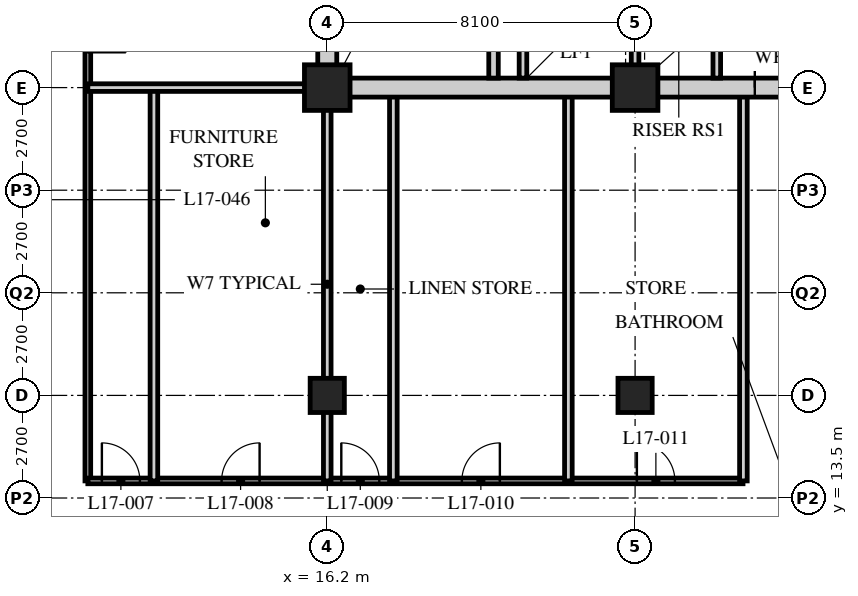
"""IFC4 building model, lengths in metres.
Left out: names, types, materials, properties, quantities, classifications, styles, units other than length and angle.
Written with IfcOpenShell. Run it as: python <this file> out.ifc"""

import sys

from ifc_helpers import new_model, si_unit, direction, frame, frame_2d, origin, origin_2d, place, context, subcontext, project, spatial, rectangle, hollow_rectangle, extrude, element, fill, save


model = new_model("IFC4")
c1 = context("Model", 3, precision=1e-05, world=origin(), true_north=direction((0.0, 1.0)))
c2 = subcontext(c1, "Body", "Model", "MODEL_VIEW")
j1 = project(units=[si_unit("LENGTHUNIT", "METRE"), si_unit("PLANEANGLEUNIT", "RADIAN")], contexts=[c1])
p1 = place(None, origin())
s1 = spatial("IfcSite", under=j1, at=p1, CompositionType="ELEMENT")
p2 = place(p1, origin())
s2 = spatial("IfcBuilding", under=s1, at=p2, CompositionType="ELEMENT")
p3 = place(p2, frame((0.0, 0.0, 70.4)))
s3 = spatial("IfcBuildingStorey", under=s2, at=p3, CompositionType="ELEMENT", Elevation=70.4)
p4 = place(p3, frame((16.2, 16.2, 0.0), z_axis=(0.0, 0.0, 1.0), x_axis=(1.0, 0.0, 0.0)))
e1 = element("IfcColumn", 1, at=p4, inside=s3, PredefinedType="COLUMN", context=c2, shape_type="SweptSolid", body=[
    extrude(hollow_rectangle(XDim=0.9, YDim=0.9, WallThickness=0.09, at=origin_2d()), origin(), (0.0, 0.0, 1.0), 3.4),
])
p5 = place(p3, frame((16.2, 24.3, 0.0), z_axis=(0.0, 0.0, 1.0), x_axis=(1.0, 0.0, 0.0)))
e2 = element("IfcColumn", 2, at=p5, inside=s3, PredefinedType="COLUMN", context=c2, shape_type="SweptSolid", body=[
    extrude(hollow_rectangle(XDim=1.2, YDim=1.2, WallThickness=0.12, at=origin_2d()), origin(), (0.0, 0.0, 1.0), 3.4),
])
p6 = place(p3, frame((24.3, 16.2, 0.0), z_axis=(0.0, 0.0, 1.0), x_axis=(1.0, 0.0, 0.0)))
e3 = element("IfcColumn", 3, at=p6, inside=s3, PredefinedType="COLUMN", context=c2, shape_type="SweptSolid", body=[
    extrude(hollow_rectangle(XDim=0.9, YDim=0.9, WallThickness=0.09, at=origin_2d()), origin(), (0.0, 0.0, 1.0), 3.4),
])
p7 = place(p3, frame((24.3, 24.3, 0.0), z_axis=(0.0, 0.0, 1.0), x_axis=(1.0, 0.0, 0.0)))
e4 = element("IfcColumn", 4, at=p7, inside=s3, PredefinedType="COLUMN", context=c2, shape_type="SweptSolid", body=[
    extrude(hollow_rectangle(XDim=1.2, YDim=1.2, WallThickness=0.12, at=origin_2d()), origin(), (0.0, 0.0, 1.0), 3.4),
])
p8 = place(p3, frame((9.9, 40.5, 0.0), z_axis=(0.0, 0.0, 1.0), x_axis=(0.0, -1.0, 0.0)))
e5 = element("IfcWall", 5, at=p8, inside=s3, PredefinedType="PARTITIONING", context=c2, shape_type="SweptSolid", body=[
    extrude(rectangle(XDim=26.55, YDim=0.15, at=frame_2d((13.275, 0.0))), origin(), (0.0, 0.0, 1.0), 3.19),
])
p9 = place(p8, frame((14.271, 0.0, 0.0)))
e6 = element("IfcOpeningElement", 6, at=p9, cuts=e5, PredefinedType="OPENING", context=c2, shape_type="SweptSolid", body=[
    extrude(rectangle(XDim=1.0, YDim=2.1, at=frame_2d((0.5, 1.05))), frame((0.0, 0.085, 0.0), z_axis=(0.0, -1.0, 0.0), x_axis=(1.0, 0.0, 0.0)), (0.0, 0.0, 1.0), 0.17),
])
p10 = place(p8, frame((10.221, 0.0, 0.0)))
e7 = element("IfcOpeningElement", 7, at=p10, cuts=e5, PredefinedType="OPENING", context=c2, shape_type="SweptSolid", body=[
    extrude(rectangle(XDim=1.0, YDim=2.1, at=frame_2d((0.5, 1.05))), frame((0.0, 0.085, 0.0), z_axis=(0.0, -1.0, 0.0), x_axis=(1.0, 0.0, 0.0)), (0.0, 0.0, 1.0), 0.17),
])
p11 = place(p8, frame((6.8, 0.0, 0.0)))
e8 = element("IfcOpeningElement", 8, at=p11, cuts=e5, PredefinedType="OPENING", context=c2, shape_type="SweptSolid", body=[
    extrude(rectangle(XDim=1.0, YDim=2.1, at=frame_2d((0.5, 1.05))), frame((0.0, 0.085, 0.0), z_axis=(0.0, -1.0, 0.0), x_axis=(1.0, 0.0, 0.0)), (0.0, 0.0, 1.0), 0.17),
])
p12 = place(p8, frame((2.75, 0.0, 0.0)))
e9 = element("IfcOpeningElement", 9, at=p12, cuts=e5, PredefinedType="OPENING", context=c2, shape_type="SweptSolid", body=[
    extrude(rectangle(XDim=1.0, YDim=2.1, at=frame_2d((0.5, 1.05))), frame((0.0, 0.085, 0.0), z_axis=(0.0, -1.0, 0.0), x_axis=(1.0, 0.0, 0.0)), (0.0, 0.0, 1.0), 0.17),
])
p13 = place(p3, frame((9.9, 13.95, 0.0), z_axis=(0.0, 0.0, 1.0), x_axis=(1.0, 0.0, 0.0)))
e10 = element("IfcWall", 10, at=p13, inside=s3, PredefinedType="PARTITIONING", context=c2, shape_type="SweptSolid", body=[
    extrude(rectangle(XDim=17.24, YDim=0.15, at=frame_2d((8.62, 0.0))), origin(), (0.0, 0.0, 1.0), 3.19),
])
p14 = place(p13, frame((0.37, 0.0, 0.0)))
e11 = element("IfcOpeningElement", 11, at=p14, cuts=e10, PredefinedType="OPENING", context=c2, shape_type="SweptSolid", body=[
    extrude(rectangle(XDim=1.0, YDim=2.1, at=frame_2d((0.5, 1.05))), frame((0.0, 0.085, 0.0), z_axis=(0.0, -1.0, 0.0), x_axis=(1.0, 0.0, 0.0)), (0.0, 0.0, 1.0), 0.17),
])
p15 = place(p13, frame((3.52, 0.0, 0.0)))
e12 = element("IfcOpeningElement", 12, at=p15, cuts=e10, PredefinedType="OPENING", context=c2, shape_type="SweptSolid", body=[
    extrude(rectangle(XDim=1.0, YDim=2.1, at=frame_2d((0.5, 1.05))), frame((0.0, 0.085, 0.0), z_axis=(0.0, -1.0, 0.0), x_axis=(1.0, 0.0, 0.0)), (0.0, 0.0, 1.0), 0.17),
])
p16 = place(p13, frame((6.67, 0.0, 0.0)))
e13 = element("IfcOpeningElement", 13, at=p16, cuts=e10, PredefinedType="OPENING", context=c2, shape_type="SweptSolid", body=[
    extrude(rectangle(XDim=1.0, YDim=2.1, at=frame_2d((0.5, 1.05))), frame((0.0, 0.085, 0.0), z_axis=(0.0, -1.0, 0.0), x_axis=(1.0, 0.0, 0.0)), (0.0, 0.0, 1.0), 0.17),
])
p17 = place(p13, frame((9.842, 0.0, 0.0)))
e14 = element("IfcOpeningElement", 14, at=p17, cuts=e10, PredefinedType="OPENING", context=c2, shape_type="SweptSolid", body=[
    extrude(rectangle(XDim=1.0, YDim=2.1, at=frame_2d((0.5, 1.05))), frame((0.0, 0.085, 0.0), z_axis=(0.0, -1.0, 0.0), x_axis=(1.0, 0.0, 0.0)), (0.0, 0.0, 1.0), 0.17),
])
p18 = place(p13, frame((14.447, 0.0, 0.0)))
e15 = element("IfcOpeningElement", 15, at=p18, cuts=e10, PredefinedType="OPENING", context=c2, shape_type="SweptSolid", body=[
    extrude(rectangle(XDim=1.0, YDim=2.1, at=frame_2d((0.5, 1.05))), frame((0.0, 0.085, 0.0), z_axis=(0.0, -1.0, 0.0), x_axis=(1.0, 0.0, 0.0)), (0.0, 0.0, 1.0), 0.17),
])
p19 = place(p3, frame((16.2, 13.95, 0.0), z_axis=(0.0, 0.0, 1.0), x_axis=(0.0, 1.0, 0.0)))
e16 = element("IfcWall", 16, at=p19, inside=s3, PredefinedType="SOLIDWALL", context=c2, shape_type="SweptSolid", body=[
    extrude(rectangle(XDim=10.35, YDim=0.2, at=frame_2d((5.175, 0.0))), origin(), (0.0, 0.0, 1.0), 2.578),
])
for number, where, z_axis, x_axis in (
    (17, (11.639, 13.95, 0.0), (0.0, 0.0, 1.0), (0.0, 1.0, 0.0)),
    (18, (17.939, 13.95, 0.0), (0.0, 0.0, 1.0), (0.0, 1.0, 0.0)),
    (19, (22.545, 13.95, 0.0), (0.0, 0.0, 1.0), (0.0, 1.0, 0.0)),
    (20, (27.15, 13.95, 0.0), (0.0, 0.0, 1.0), (0.0, 1.0, 0.0)),
):
    element("IfcWall", number, at=place(p3, frame(where, z_axis=z_axis, x_axis=x_axis)), inside=s3, PredefinedType="SOLIDWALL", context=c2, shape_type="SweptSolid", body=[
        extrude(rectangle(XDim=10.35, YDim=0.2, at=frame_2d((5.175, 0.0))), origin(), (0.0, 0.0, 1.0), 3.19),
    ])
p20 = place(p3, frame((9.9, 24.3, 0.0), z_axis=(0.0, 0.0, 1.0), x_axis=(1.0, 0.0, 0.0)))
e21 = element("IfcWall", 21, at=p20, inside=s3, PredefinedType="SOLIDWALL", context=c2, shape_type="SweptSolid", body=[
    extrude(rectangle(XDim=6.3, YDim=0.2, at=frame_2d((3.15, 0.0))), origin(), (0.0, 0.0, 1.0), 2.578),
])
p21 = place(p3, frame((15.95, 24.3, 0.0), z_axis=(0.0, 0.0, 1.0), x_axis=(1.0, 0.0, 0.0)))
e22 = element("IfcWall", 22, at=p21, inside=s3, PredefinedType="SOLIDWALL", context=c2, shape_type="SweptSolid", body=[
    extrude(rectangle(XDim=24.8, YDim=0.5, at=frame_2d((12.4, 0.0))), origin(), (0.0, 0.0, 1.0), 2.54),
])
p22 = place(p21, frame((11.5, 0.0, 0.0)))
e23 = element("IfcOpeningElement", 23, at=p22, cuts=e22, PredefinedType="OPENING", context=c2, shape_type="SweptSolid", body=[
    extrude(rectangle(XDim=1.8, YDim=2.4, at=frame_2d((0.9, 1.2))), frame((0.0, 0.26, 0.0), z_axis=(0.0, -1.0, 0.0), x_axis=(1.0, 0.0, 0.0)), (0.0, 0.0, 1.0), 0.52),
])
p23 = place(p3, frame((16.2, 24.55, 0.0), z_axis=(0.0, 0.0, 1.0), x_axis=(0.0, 1.0, 0.0)))
e24 = element("IfcWall", 24, at=p23, inside=s3, PredefinedType="SOLIDWALL", context=c2, shape_type="SweptSolid", body=[
    extrude(rectangle(XDim=15.7, YDim=0.5, at=frame_2d((7.85, 0.0))), origin(), (0.0, 0.0, 1.0), 2.578),
])
p24 = place(p3, frame((24.3, 24.55, 0.0), z_axis=(0.0, 0.0, 1.0), x_axis=(0.0, 1.0, 0.0)))
e25 = element("IfcWall", 25, at=p24, inside=s3, PredefinedType="SOLIDWALL", context=c2, shape_type="SweptSolid", body=[
    extrude(rectangle(XDim=7.75, YDim=0.2, at=frame_2d((3.875, 0.0))), origin(), (0.0, 0.0, 1.0), 2.578),
])
p25 = place(p24, frame((4.6, 0.0, 0.0)))
e26 = element("IfcOpeningElement", 26, at=p25, cuts=e25, PredefinedType="OPENING", context=c2, shape_type="SweptSolid", body=[
    extrude(rectangle(XDim=1.2, YDim=2.1, at=frame_2d((0.6, 1.05))), frame((0.0, 0.11, 0.0), z_axis=(0.0, -1.0, 0.0), x_axis=(1.0, 0.0, 0.0)), (0.0, 0.0, 1.0), 0.22),
])
p26 = place(p3, frame((20.575, 24.55, 0.0), z_axis=(0.0, 0.0, 1.0), x_axis=(0.0, 1.0, 0.0)))
e27 = element("IfcWall", 27, at=p26, inside=s3, PredefinedType="SOLIDWALL", context=c2, shape_type="SweptSolid", body=[
    extrude(rectangle(XDim=7.75, YDim=0.25, at=frame_2d((3.875, 0.0))), origin(), (0.0, 0.0, 1.0), 3.19),
])
p27 = place(p26, frame((6.2, 0.0, 0.0)))
e28 = element("IfcOpeningElement", 28, at=p27, cuts=e27, PredefinedType="OPENING", context=c2, shape_type="SweptSolid", body=[
    extrude(rectangle(XDim=1.2, YDim=2.1, at=frame_2d((0.6, 1.05))), frame((0.0, 0.135, 0.0), z_axis=(0.0, -1.0, 0.0), x_axis=(1.0, 0.0, 0.0)), (0.0, 0.0, 1.0), 0.27),
])
p28 = place(p3, frame((21.35, 24.55, 0.0), z_axis=(0.0, 0.0, 1.0), x_axis=(0.0, 1.0, 0.0)))
e29 = element("IfcWall", 29, at=p28, inside=s3, PredefinedType="SOLIDWALL", context=c2, shape_type="SweptSolid", body=[
    extrude(rectangle(XDim=2.6, YDim=0.2, at=frame_2d((1.3, 0.0))), origin(), (0.0, 0.0, 1.0), 3.19),
])
p29 = place(p3, frame((26.45, 24.55, 0.0), z_axis=(0.0, 0.0, 1.0), x_axis=(0.0, 1.0, 0.0)))
e30 = element("IfcWall", 30, at=p29, inside=s3, PredefinedType="SOLIDWALL", context=c2, shape_type="SweptSolid", body=[
    extrude(rectangle(XDim=1.6, YDim=0.2, at=frame_2d((0.8, 0.0))), origin(), (0.0, 0.0, 1.0), 3.19),
])
p30 = place(p14, origin())
e31 = element("IfcDoor", 31, at=p30, inside=s3, OperationType="SINGLE_SWING_LEFT", PredefinedType="DOOR", context=c2, shape_type="SweptSolid", body=[
    extrude(rectangle(XDim=1.0, YDim=2.1, at=frame_2d((0.5, 1.05))), frame((0.0, 0.025, 0.0), z_axis=(0.0, -1.0, 0.0), x_axis=(1.0, 0.0, 0.0)), (0.0, 0.0, 1.0), 0.05),
])
fill(e11, e31)
p31 = place(p15, origin())
e32 = element("IfcDoor", 32, at=p31, inside=s3, OperationType="SINGLE_SWING_RIGHT", PredefinedType="DOOR", context=c2, shape_type="SweptSolid", body=[
    extrude(rectangle(XDim=1.0, YDim=2.1, at=frame_2d((0.5, 1.05))), frame((0.0, 0.025, 0.0), z_axis=(0.0, -1.0, 0.0), x_axis=(1.0, 0.0, 0.0)), (0.0, 0.0, 1.0), 0.05),
])
fill(e12, e32)
p32 = place(p16, origin())
e33 = element("IfcDoor", 33, at=p32, inside=s3, OperationType="SINGLE_SWING_LEFT", PredefinedType="DOOR", context=c2, shape_type="SweptSolid", body=[
    extrude(rectangle(XDim=1.0, YDim=2.1, at=frame_2d((0.5, 1.05))), frame((0.0, 0.025, 0.0), z_axis=(0.0, -1.0, 0.0), x_axis=(1.0, 0.0, 0.0)), (0.0, 0.0, 1.0), 0.05),
])
fill(e13, e33)
p33 = place(p17, origin())
e34 = element("IfcDoor", 34, at=p33, inside=s3, OperationType="SINGLE_SWING_RIGHT", PredefinedType="DOOR", context=c2, shape_type="SweptSolid", body=[
    extrude(rectangle(XDim=1.0, YDim=2.1, at=frame_2d((0.5, 1.05))), frame((0.0, 0.025, 0.0), z_axis=(0.0, -1.0, 0.0), x_axis=(1.0, 0.0, 0.0)), (0.0, 0.0, 1.0), 0.05),
])
fill(e14, e34)
p34 = place(p18, origin())
e35 = element("IfcDoor", 35, at=p34, inside=s3, OperationType="SINGLE_SWING_LEFT", PredefinedType="DOOR", context=c2, shape_type="SweptSolid", body=[
    extrude(rectangle(XDim=1.0, YDim=2.1, at=frame_2d((0.5, 1.05))), frame((0.0, 0.025, 0.0), z_axis=(0.0, -1.0, 0.0), x_axis=(1.0, 0.0, 0.0)), (0.0, 0.0, 1.0), 0.05),
])
fill(e15, e35)
p35 = place(p22, origin())
e36 = element("IfcDoor", 36, at=p35, inside=s3, OperationType="DOUBLE_DOOR_SINGLE_SWING", PredefinedType="DOOR", context=c2, shape_type="SweptSolid", body=[
    extrude(rectangle(XDim=1.8, YDim=2.4, at=frame_2d((0.9, 1.2))), frame((0.0, 0.025, 0.0), z_axis=(0.0, -1.0, 0.0), x_axis=(1.0, 0.0, 0.0)), (0.0, 0.0, 1.0), 0.05),
])
fill(e23, e36)
save(model, sys.argv[1])
